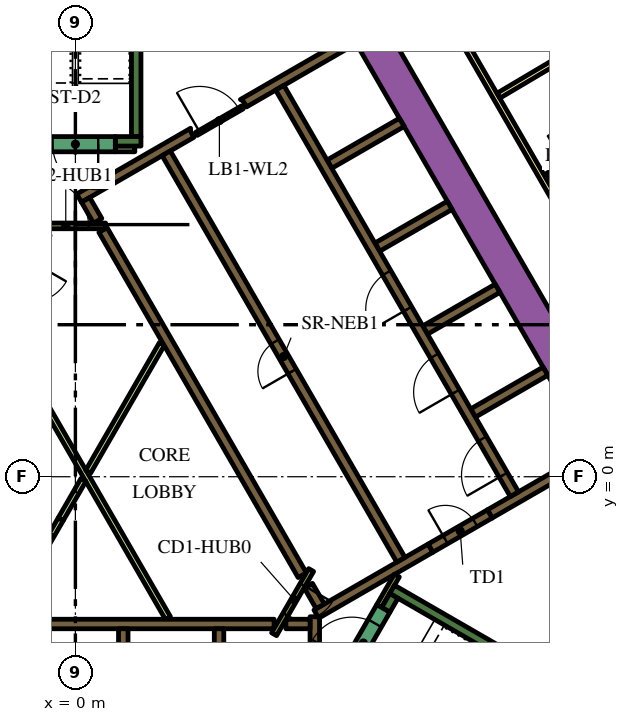
"""IFC4 building model, lengths in metres.
Left out: names, types, materials, properties, quantities, classifications, styles, units other than length and angle.
Written with IfcOpenShell. Run it as: python <this file> out.ifc"""

import sys

from ifc_helpers import new_model, si_unit, direction, frame, frame_2d, origin, place, context, subcontext, project, spatial, polyline, rectangle, outline, extrude, element, fill, save


model = new_model("IFC4")
c1 = context("Model", 3, precision=1e-05, world=origin(), true_north=direction((0.0, 1.0)))
c2 = subcontext(c1, "Body", "Model", "MODEL_VIEW")
j1 = project(units=[si_unit("LENGTHUNIT", "METRE"), si_unit("PLANEANGLEUNIT", "RADIAN")], contexts=[c1])
p1 = place(None, origin())
s1 = spatial("IfcSite", under=j1, at=p1, CompositionType="ELEMENT")
p2 = place(p1, origin())
s2 = spatial("IfcBuilding", under=s1, at=p2, CompositionType="ELEMENT")
p3 = place(p2, frame((0.0, 0.0, 122.7)))
s3 = spatial("IfcBuildingStorey", under=s2, at=p3, CompositionType="ELEMENT", Elevation=122.7)
p4 = place(p3, frame((6.776, 13.364, 0.0), z_axis=(0.0, 0.0, 1.0), x_axis=(0.500004177138, -0.8660229921, 0.0)))
e1 = element("IfcWall", 1, at=p4, inside=s3, PredefinedType="SOLIDWALL", context=c2, shape_type="SweptSolid", body=[
    extrude(rectangle(XDim=20.204, YDim=0.9, at=frame_2d((10.102, 0.0))), origin(), (0.0, 0.0, 1.0), 3.9),
])
p5 = place(p3, frame((11.943, -12.214, 0.0), z_axis=(0.0, 0.0, 1.0), x_axis=(0.49998092645, 0.866036415623, 0.0)))
e2 = element("IfcWall", 2, at=p5, inside=s3, PredefinedType="SOLIDWALL", context=c2, shape_type="SweptSolid", body=[
    extrude(rectangle(XDim=8.83, YDim=0.9, at=frame_2d((4.415, 0.0))), origin(), (0.0, 0.0, 1.0), 3.9),
])
p6 = place(p3, frame((8.334, -2.964, 0.0), z_axis=(0.0, 0.0, 1.0), x_axis=(0.866016039709, -0.500016218704, 0.0)))
e3 = element("IfcWall", 3, at=p6, inside=s3, PredefinedType="SOLIDWALL", context=c2, shape_type="SweptSolid", body=[
    extrude(rectangle(XDim=7.05, YDim=0.25, at=frame_2d((3.525, 0.0))), origin(), (0.0, 0.0, 1.0), 3.9),
])
p7 = place(p3, frame((8.168, -3.503, 0.0), z_axis=(0.0, 0.0, 1.0), x_axis=(0.49972245349, 0.866185586049, 0.0)))
e4 = element("IfcWall", 4, at=p7, inside=s3, PredefinedType="SOLIDWALL", context=c2, shape_type="SweptSolid", body=[
    extrude(rectangle(XDim=0.425, YDim=0.25, at=frame_2d((0.212, 0.0))), origin(), (0.0, 0.0, 1.0), 3.9),
])
p8 = place(p3, frame((1.6, 8.95, 0.0), z_axis=(0.0, 0.0, 1.0), x_axis=(0.0, 1.0, 0.0)))
e5 = element("IfcWall", 5, at=p8, inside=s3, PredefinedType="SOLIDWALL", context=c2, shape_type="SweptSolid", body=[
    extrude(rectangle(XDim=6.8, YDim=0.25, at=frame_2d((3.4, 0.0))), origin(), (0.0, 0.0, 1.0), 3.9),
])
p9 = place(p3, frame((1.05, 8.825, 0.0), z_axis=(0.0, 0.0, 1.0), x_axis=(1.0, 0.0, 0.0)))
e6 = element("IfcWall", 6, at=p9, inside=s3, PredefinedType="SOLIDWALL", context=c2, shape_type="SweptSolid", body=[
    extrude(rectangle(XDim=0.675, YDim=0.25, at=frame_2d((0.337, 0.0))), origin(), (0.0, 0.0, 1.0), 3.9),
])
p10 = place(p3, frame((-5.259, -3.875, 0.0), z_axis=(0.0, 0.0, 1.0), x_axis=(1.0, 0.0, 0.0)))
e7 = element("IfcWall", 7, at=p10, inside=s3, PredefinedType="SOLIDWALL", context=c2, shape_type="SweptSolid", body=[
    extrude(rectangle(XDim=10.489, YDim=0.25, at=frame_2d((5.244, 0.0))), origin(), (0.0, 0.0, 1.0), 3.9),
])
for number, where, z_axis, x_axis in (
    (8, (3.78, -4.0, 0.0), (0.0, 0.0, 1.0), (0.0, -1.0, 0.0)),
    (9, (1.26, -4.0, 0.0), (0.0, 0.0, 1.0), (0.0, -1.0, 0.0)),
):
    element("IfcWall", number, at=place(p3, frame(where, z_axis=z_axis, x_axis=x_axis)), inside=s3, PredefinedType="SOLIDWALL", context=c2, shape_type="SweptSolid", body=[
        extrude(rectangle(XDim=2.2, YDim=0.25, at=frame_2d((1.1, 0.0))), origin(), (0.0, 0.0, 1.0), 3.9),
    ])
p11 = place(p3, frame((6.3, -7.27, 0.0), z_axis=(0.0, 0.0, 1.0), x_axis=(0.0, 1.0, 0.0)))
e10 = element("IfcWall", 10, at=p11, inside=s3, PredefinedType="SOLIDWALL", context=c2, shape_type="SweptSolid", body=[
    extrude(rectangle(XDim=3.586, YDim=0.25, at=frame_2d((1.793, 0.0))), origin(), (0.0, 0.0, 1.0), 3.9),
])
p12 = place(p3, frame((5.538, -3.875, 0.0), z_axis=(0.0, 0.0, 1.0), x_axis=(1.0, 0.0, 0.0)))
e11 = element("IfcWall", 11, at=p12, inside=s3, PredefinedType="SOLIDWALL", context=c2, shape_type="SweptSolid", body=[
    extrude(rectangle(XDim=0.637, YDim=0.25, at=frame_2d((0.318, 0.0))), origin(), (0.0, 0.0, 1.0), 3.9),
])
p13 = place(p3, frame((10.464, 1.677, 0.0), z_axis=(0.0, 0.0, 1.0), x_axis=(0.86605622881, 0.499946605688, 0.0)))
e12 = element("IfcWall", 12, at=p13, inside=s3, PredefinedType="SOLIDWALL", context=c2, shape_type="SweptSolid", body=[
    extrude(rectangle(XDim=2.2, YDim=0.25, at=frame_2d((1.1, 0.0))), origin(), (0.0, 0.0, 1.0), 3.9),
])
p14 = place(p3, frame((13.629, 0.594, 0.0), z_axis=(0.0, 0.0, 1.0), x_axis=(-0.86602790099, -0.499995674689, 0.0)))
e13 = element("IfcWall", 13, at=p14, inside=s3, PredefinedType="SOLIDWALL", context=c2, shape_type="SweptSolid", body=[
    extrude(rectangle(XDim=3.146, YDim=0.25, at=frame_2d((1.573, 0.0))), origin(), (0.0, 0.0, 1.0), 3.9),
])
p15 = place(p3, frame((9.346, -1.879, 0.0), z_axis=(0.0, 0.0, 1.0), x_axis=(-0.866048528039, -0.499959945477, 0.0)))
e14 = element("IfcWall", 14, at=p15, inside=s3, PredefinedType="SOLIDWALL", context=c2, shape_type="SweptSolid", body=[
    extrude(rectangle(XDim=3.47, YDim=0.25, at=frame_2d((1.735, 0.0))), origin(), (0.0, 0.0, 1.0), 3.9),
])
p16 = place(p3, frame((6.13, -2.867, 0.0), z_axis=(0.0, 0.0, 1.0), x_axis=(0.500160776593, -0.865932559475, 0.0)))
e15 = element("IfcWall", 15, at=p16, inside=s3, PredefinedType="SOLIDWALL", context=c2, shape_type="SweptSolid", body=[
    extrude(rectangle(XDim=0.627, YDim=0.25, at=frame_2d((0.313, 0.0))), origin(), (0.0, 0.0, 1.0), 3.9),
])
for number, where, z_axis, x_axis in (
    (16, (9.204, 3.859, 0.0), (0.0, 0.0, 1.0), (0.866, 0.5, 0.0)),
    (17, (7.944, 6.041, 0.0), (0.0, 0.0, 1.0), (0.866, 0.5, 0.0)),
    (18, (6.684, 8.224, 0.0), (0.0, 0.0, 1.0), (0.866, 0.5, 0.0)),
):
    element("IfcWall", number, at=place(p3, frame(where, z_axis=z_axis, x_axis=x_axis)), inside=s3, PredefinedType="SOLIDWALL", context=c2, shape_type="SweptSolid", body=[
        extrude(rectangle(XDim=2.2, YDim=0.25, at=frame_2d((1.1, 0.0))), origin(), (0.0, 0.0, 1.0), 3.9),
    ])
p17 = place(p3, origin())
e19 = element("IfcWall", 19, at=p17, inside=s3, PredefinedType="SOLIDWALL", context=c2, shape_type="SweptSolid", body=[
    extrude(outline(polyline([(2.776, 8.733), (2.499, 8.573), (2.498, 8.573), (2.498, 8.573), (2.282, 8.448), (2.282, 8.448), (0.377, 7.348), (0.16, 7.223), (0.035, 7.439), (3.032, 9.169), (3.03, 9.152), (3.03, 9.133), (3.031, 9.113), (3.035, 9.094), (3.04, 9.075), (3.047, 9.057), (3.056, 9.039), (3.119, 8.931), (2.776, 8.733)])), origin(), (0.0, 0.0, 1.0), 3.9),
])
e20 = element("IfcWall", 20, at=p17, inside=s3, PredefinedType="SOLIDWALL", context=c2, shape_type="SweptSolid", body=[
    extrude(outline(polyline([(5.27, 10.173), (5.27, 10.173), (4.683, 9.834), (4.504, 9.731), (4.442, 9.839), (4.431, 9.856), (4.419, 9.871), (4.406, 9.885), (4.39, 9.898), (4.374, 9.909), (4.357, 9.918), (4.341, 9.925), (7.266, 11.614), (7.391, 11.398), (5.486, 10.298), (5.486, 10.298), (5.27, 10.173), (5.27, 10.173)])), origin(), (0.0, 0.0, 1.0), 3.9),
])
p18 = place(p3, frame((0.268, 7.285, 0.0), z_axis=(0.0, 0.0, 1.0), x_axis=(0.500098681536, -0.865968422476, 0.0)))
e21 = element("IfcWall", 21, at=p18, inside=s3, PredefinedType="SOLIDWALL", context=c2, shape_type="SweptSolid", body=[
    extrude(rectangle(XDim=0.636, YDim=0.25, at=frame_2d((0.318, 0.0))), origin(), (0.0, 0.0, 1.0), 3.9),
])
p19 = place(p3, frame((5.97, -2.591, 0.0), z_axis=(0.0, 0.0, 1.0), x_axis=(-0.499994469932, 0.866028596547, 0.0)))
e22 = element("IfcWall", 22, at=p19, inside=s3, PredefinedType="SOLIDWALL", context=c2, shape_type="SweptSolid", body=[
    extrude(rectangle(XDim=10.488, YDim=0.25, at=frame_2d((5.244, 0.0))), origin(), (0.0, 0.0, 1.0), 3.9),
])
p20 = place(p3, frame((8.459, -2.599, 0.0), z_axis=(0.0, 0.0, 1.0), x_axis=(-0.500041054325, -0.866001699761, 0.0)))
e23 = element("IfcWall", 23, at=p20, inside=s3, PredefinedType="PARTITIONING", context=c2, shape_type="SweptSolid", body=[
    extrude(rectangle(XDim=0.929, YDim=0.15, at=frame_2d((0.464, 0.0))), origin(), (0.0, 0.0, 1.0), 3.9),
])
p21 = place(p3, frame((2.435, -3.718, 0.0), z_axis=(0.0, 0.0, 1.0), x_axis=(-0.499985176046, 0.866033962229, 0.0)))
e24 = element("IfcWall", 24, at=p21, inside=s3, PredefinedType="PARTITIONING", context=c2, shape_type="SweptSolid", body=[
    extrude(rectangle(XDim=8.875, YDim=0.15, at=frame_2d((4.438, 0.0))), origin(), (0.0, 0.0, 1.0), 2.75),
])
p22 = place(p3, frame((0.336, 0.132, 0.0), z_axis=(0.0, 0.0, 1.0), x_axis=(0.500001957507, 0.866024273614, 0.0)))
e25 = element("IfcWall", 25, at=p22, inside=s3, PredefinedType="PARTITIONING", context=c2, shape_type="SweptSolid", body=[
    extrude(rectangle(XDim=3.881, YDim=0.15, at=frame_2d((1.941, 0.0))), origin(), (0.0, 0.0, 1.0), 2.75),
])
p23 = place(p3, frame((-0.387, -1.121, 0.0), z_axis=(0.0, 0.0, 1.0), x_axis=(0.500057179532, 0.865992388649, 0.0)))
e26 = element("IfcWall", 26, at=p23, inside=s3, PredefinedType="PARTITIONING", context=c2, shape_type="SweptSolid", body=[
    extrude(rectangle(XDim=1.199, YDim=0.15, at=frame_2d((0.6, 0.0))), origin(), (0.0, 0.0, 1.0), 2.75),
])
p24 = place(p3, frame((1.05, 8.625, 0.0), z_axis=(0.0, 0.0, 1.0), x_axis=(1.0, 0.0, 0.0)))
e27 = element("IfcWall", 27, at=p24, inside=s3, PredefinedType="PARTITIONING", context=c2, shape_type="SweptSolid", body=[
    extrude(rectangle(XDim=0.514, YDim=0.15, at=frame_2d((0.257, 0.0))), origin(), (0.0, 0.0, 1.0), 2.75),
])
p25 = place(p3, frame((11.553, -0.46, 0.0), z_axis=(0.0, 0.0, 1.0), x_axis=(-0.500006514828, 0.866021642414, 0.0)))
e28 = element("IfcWall", 28, at=p25, inside=s3, PredefinedType="SOLIDWALL", context=c2, shape_type="SweptSolid", body=[
    extrude(rectangle(XDim=12.35, YDim=0.25, at=frame_2d((6.175, 0.0))), origin(), (0.0, 0.0, 1.0), 3.9),
])
p26 = place(p25, frame((0.585, 0.0, 0.0)))
e29 = element("IfcOpeningElement", 29, at=p26, cuts=e28, PredefinedType="OPENING", context=c2, shape_type="SweptSolid", body=[
    extrude(rectangle(XDim=1.1, YDim=2.1, at=frame_2d((0.55, 1.05))), frame((0.0, 0.135, 0.0), z_axis=(0.0, -1.0, 0.0), x_axis=(1.0, 0.0, 0.0)), (0.0, 0.0, 1.0), 0.27),
])
p27 = place(p25, frame((3.105, 0.0, 0.0)))
e30 = element("IfcOpeningElement", 30, at=p27, cuts=e28, PredefinedType="OPENING", context=c2, shape_type="SweptSolid", body=[
    extrude(rectangle(XDim=1.1, YDim=2.1, at=frame_2d((0.55, 1.05))), frame((0.0, 0.135, 0.0), z_axis=(0.0, -1.0, 0.0), x_axis=(1.0, 0.0, 0.0)), (0.0, 0.0, 1.0), 0.27),
])
p28 = place(p25, frame((5.625, 0.0, 0.0)))
e31 = element("IfcOpeningElement", 31, at=p28, cuts=e28, PredefinedType="OPENING", context=c2, shape_type="SweptSolid", body=[
    extrude(rectangle(XDim=1.1, YDim=2.1, at=frame_2d((0.55, 1.05))), frame((0.0, 0.135, 0.0), z_axis=(0.0, -1.0, 0.0), x_axis=(1.0, 0.0, 0.0)), (0.0, 0.0, 1.0), 0.27),
])
p29 = place(p3, frame((8.565, -2.185, 0.0), z_axis=(0.0, 0.0, 1.0), x_axis=(-0.499997954832, 0.866026584559, 0.0)))
e32 = element("IfcWall", 32, at=p29, inside=s3, PredefinedType="SOLIDWALL", context=c2, shape_type="SweptSolid", body=[
    extrude(rectangle(XDim=12.35, YDim=0.25, at=frame_2d((6.175, 0.0))), origin(), (0.0, 0.0, 1.0), 3.9),
])
p30 = place(p29, frame((5.725, 0.0, 0.0)))
e33 = element("IfcOpeningElement", 33, at=p30, cuts=e32, PredefinedType="OPENING", context=c2, shape_type="SweptSolid", body=[
    extrude(rectangle(XDim=0.9, YDim=2.1, at=frame_2d((0.45, 1.05))), frame((0.0, 0.135, 0.0), z_axis=(0.0, -1.0, 0.0), x_axis=(1.0, 0.0, 0.0)), (0.0, 0.0, 1.0), 0.27),
])
p31 = place(p3, frame((7.053, -5.284, 0.0), z_axis=(0.0, 0.0, 1.0), x_axis=(0.500078061341, 0.865980330357, 0.0)))
e34 = element("IfcWall", 34, at=p31, inside=s3, PredefinedType="SOLIDWALL", context=c2, shape_type="SweptSolid", body=[
    extrude(rectangle(XDim=2.1, YDim=0.4, at=frame_2d((1.05, 0.0))), origin(), (0.0, 0.0, 1.0), 3.9),
])
p32 = place(p31, frame((0.45, 0.0, 0.0)))
e35 = element("IfcOpeningElement", 35, at=p32, cuts=e34, PredefinedType="OPENING", context=c2, shape_type="SweptSolid", body=[
    extrude(rectangle(XDim=1.2, YDim=2.1, at=frame_2d((0.6, 1.05))), frame((0.0, 0.21, 0.0), z_axis=(0.0, -1.0, 0.0), x_axis=(1.0, 0.0, 0.0)), (0.0, 0.0, 1.0), 0.42),
])
p33 = place(p3, frame((9.346, -1.879, 0.0), z_axis=(0.0, 0.0, 1.0), x_axis=(0.866047807691, 0.499961193289, 0.0)))
e36 = element("IfcWall", 36, at=p33, inside=s3, PredefinedType="SOLIDWALL", context=c2, shape_type="SweptSolid", body=[
    extrude(rectangle(XDim=1.8, YDim=0.25, at=frame_2d((0.9, 0.0))), origin(), (0.0, 0.0, 1.0), 3.9),
])
p34 = place(p33, frame((0.45, 0.0, 0.0)))
e37 = element("IfcOpeningElement", 37, at=p34, cuts=e36, PredefinedType="OPENING", context=c2, shape_type="SweptSolid", body=[
    extrude(rectangle(XDim=0.9, YDim=2.1, at=frame_2d((0.45, 1.05))), frame((0.0, 0.135, 0.0), z_axis=(0.0, -1.0, 0.0), x_axis=(1.0, 0.0, 0.0)), (0.0, 0.0, 1.0), 0.27),
])
p35 = place(p3, frame((1.05, 8.75, 0.0), z_axis=(0.0, 0.0, 1.0), x_axis=(-1.0, 0.0, 0.0)))
e38 = element("IfcWall", 38, at=p35, inside=s3, PredefinedType="SOLIDWALL", context=c2, shape_type="SweptSolid", body=[
    extrude(rectangle(XDim=2.1, YDim=0.4, at=frame_2d((1.05, 0.0))), origin(), (0.0, 0.0, 1.0), 3.9),
])
p36 = place(p35, frame((0.45, 0.0, 0.0)))
e39 = element("IfcOpeningElement", 39, at=p36, cuts=e38, PredefinedType="OPENING", context=c2, shape_type="SweptSolid", body=[
    extrude(rectangle(XDim=1.2, YDim=2.1, at=frame_2d((0.6, 1.05))), frame((0.0, 0.21, 0.0), z_axis=(0.0, -1.0, 0.0), x_axis=(1.0, 0.0, 0.0)), (0.0, 0.0, 1.0), 0.42),
])
p37 = place(p3, frame((6.203, -2.456, 0.0), z_axis=(0.0, 0.0, 1.0), x_axis=(-0.500043961785, -0.866000020948, 0.0)))
e40 = element("IfcWall", 40, at=p37, inside=s3, PredefinedType="PARTITIONING", context=c2, shape_type="SweptSolid", body=[
    extrude(rectangle(XDim=1.95, YDim=0.15, at=frame_2d((0.975, 0.0))), origin(), (0.0, 0.0, 1.0), 3.9),
])
p38 = place(p37, frame((0.45, 0.0, 0.0)))
e41 = element("IfcOpeningElement", 41, at=p38, cuts=e40, PredefinedType="OPENING", context=c2, shape_type="SweptSolid", body=[
    extrude(rectangle(XDim=0.9, YDim=2.1, at=frame_2d((0.45, 1.05))), frame((0.0, 0.085, 0.0), z_axis=(0.0, -1.0, 0.0), x_axis=(1.0, 0.0, 0.0)), (0.0, 0.0, 1.0), 0.17),
])
p39 = place(p3, frame((-1.303, 6.6, 0.0), z_axis=(0.0, 0.0, 1.0), x_axis=(1.0, 0.0, 0.0)))
e42 = element("IfcWall", 42, at=p39, inside=s3, PredefinedType="PARTITIONING", context=c2, shape_type="SweptSolid", body=[
    extrude(rectangle(XDim=2.1, YDim=0.15, at=frame_2d((1.05, 0.0))), origin(), (0.0, 0.0, 1.0), 3.9),
])
p40 = place(p39, frame((0.45, 0.0, 0.0)))
e43 = element("IfcOpeningElement", 43, at=p40, cuts=e42, PredefinedType="OPENING", context=c2, shape_type="SweptSolid", body=[
    extrude(rectangle(XDim=1.2, YDim=2.1, at=frame_2d((0.6, 1.05))), frame((0.0, 0.085, 0.0), z_axis=(0.0, -1.0, 0.0), x_axis=(1.0, 0.0, 0.0)), (0.0, 0.0, 1.0), 0.17),
])
p41 = place(p3, frame((3.183, 9.02, 0.0), z_axis=(0.0, 0.0, 1.0), x_axis=(0.866034573852, 0.49998411664, 0.0)))
e44 = element("IfcWall", 44, at=p41, inside=s3, PredefinedType="PARTITIONING", context=c2, shape_type="SweptSolid", body=[
    extrude(rectangle(XDim=1.4, YDim=0.09, at=frame_2d((0.7, 0.0))), origin(), (0.0, 0.0, 1.0), 2.75),
])
p42 = place(p41, frame((0.1, 0.0, 0.0)))
e45 = element("IfcOpeningElement", 45, at=p42, cuts=e44, PredefinedType="OPENING", context=c2, shape_type="SweptSolid", body=[
    extrude(rectangle(XDim=1.2, YDim=2.1, at=frame_2d((0.6, 1.05))), frame((0.0, 0.055, 0.0), z_axis=(0.0, -1.0, 0.0), x_axis=(1.0, 0.0, 0.0)), (0.0, 0.0, 1.0), 0.11),
])
p43 = place(p3, frame((-1.287, -2.679, 0.0), z_axis=(0.0, 0.0, 1.0), x_axis=(0.499961193289, 0.866047807691, 0.0)))
e46 = element("IfcWall", 46, at=p43, inside=s3, PredefinedType="PARTITIONING", context=c2, shape_type="SweptSolid", body=[
    extrude(rectangle(XDim=1.8, YDim=0.15, at=frame_2d((0.9, 0.0))), origin(), (0.0, 0.0, 1.0), 2.75),
])
p44 = place(p43, frame((0.45, 0.0, 0.0)))
e47 = element("IfcOpeningElement", 47, at=p44, cuts=e46, PredefinedType="OPENING", context=c2, shape_type="SweptSolid", body=[
    extrude(rectangle(XDim=0.9, YDim=2.1, at=frame_2d((0.45, 1.05))), frame((0.0, 0.085, 0.0), z_axis=(0.0, -1.0, 0.0), x_axis=(1.0, 0.0, 0.0)), (0.0, 0.0, 1.0), 0.17),
])
p45 = place(p3, frame((6.163, 18.475, 0.0), z_axis=(0.0, 0.0, 1.0), x_axis=(0.500001317485, -0.866024643133, 0.0)))
e48 = element("IfcWall", 48, at=p45, inside=s3, PredefinedType="PARTITIONING", context=c2, shape_type="SweptSolid", body=[
    extrude(rectangle(XDim=25.767, YDim=0.15, at=frame_2d((12.883, 0.0))), origin(), (0.0, 0.0, 1.0), 2.75),
])
p46 = place(p45, frame((19.306, 0.0, 0.0)))
e49 = element("IfcOpeningElement", 49, at=p46, cuts=e48, PredefinedType="OPENING", context=c2, shape_type="SweptSolid", body=[
    extrude(rectangle(XDim=1.0, YDim=2.1, at=frame_2d((0.5, 1.05))), frame((0.0, 0.085, 0.0), z_axis=(0.0, -1.0, 0.0), x_axis=(1.0, 0.0, 0.0)), (0.0, 0.0, 1.0), 0.17),
])
p47 = place(p45, frame((17.999, 0.0, 0.0)))
e50 = element("IfcOpeningElement", 50, at=p47, cuts=e48, PredefinedType="OPENING", context=c2, shape_type="SweptSolid", body=[
    extrude(rectangle(XDim=1.0, YDim=2.1, at=frame_2d((0.5, 1.05))), frame((0.0, 0.085, 0.0), z_axis=(0.0, -1.0, 0.0), x_axis=(1.0, 0.0, 0.0)), (0.0, 0.0, 1.0), 0.17),
])
p48 = place(p45, frame((0.596, 0.0, 0.0)))
e51 = element("IfcOpeningElement", 51, at=p48, cuts=e48, PredefinedType="OPENING", context=c2, shape_type="SweptSolid", body=[
    extrude(rectangle(XDim=1.0, YDim=2.1, at=frame_2d((0.5, 1.05))), frame((0.0, 0.085, 0.0), z_axis=(0.0, -1.0, 0.0), x_axis=(1.0, 0.0, 0.0)), (0.0, 0.0, 1.0), 0.17),
])
p49 = place(p3, frame((17.379, 13.731, 0.0), z_axis=(0.0, 0.0, 1.0), x_axis=(-0.860132461691, -0.510070728768, 0.0)))
e52 = element("IfcWall", 52, at=p49, inside=s3, PredefinedType="PARTITIONING", context=c2, shape_type="SweptSolid", body=[
    extrude(rectangle(XDim=7.257, YDim=0.15, at=frame_2d((3.628, 0.0))), origin(), (0.0, 0.0, 1.0), 2.75),
])
p50 = place(p3, frame((12.355, 7.9, 0.0), z_axis=(0.0, 0.0, 1.0), x_axis=(0.866034573852, 0.49998411664, 0.0)))
e53 = element("IfcWall", 53, at=p50, inside=s3, PredefinedType="PARTITIONING", context=c2, shape_type="SweptSolid", body=[
    extrude(rectangle(XDim=2.8, YDim=0.1, at=frame_2d((1.4, 0.0))), origin(), (0.0, 0.0, 1.0), 2.75),
])
p51 = place(p50, frame((0.6, 0.0, 0.0)))
e54 = element("IfcOpeningElement", 54, at=p51, cuts=e53, PredefinedType="OPENING", context=c2, shape_type="SweptSolid", body=[
    extrude(rectangle(XDim=0.9, YDim=2.1, at=frame_2d((0.45, 1.05))), frame((0.0, 0.06, 0.0), z_axis=(0.0, -1.0, 0.0), x_axis=(1.0, 0.0, 0.0)), (0.0, 0.0, 1.0), 0.12),
])
p52 = place(p26, origin())
e55 = element("IfcDoor", 55, at=p52, inside=s3, OperationType="DOUBLE_DOOR_SLIDING", PredefinedType="DOOR", context=c2, shape_type="SweptSolid", body=[
    extrude(rectangle(XDim=1.1, YDim=2.1, at=frame_2d((0.55, 1.05))), frame((0.0, 0.025, 0.0), z_axis=(0.0, -1.0, 0.0), x_axis=(1.0, 0.0, 0.0)), (0.0, 0.0, 1.0), 0.05),
])
fill(e29, e55)
p53 = place(p27, origin())
e56 = element("IfcDoor", 56, at=p53, inside=s3, OperationType="DOUBLE_DOOR_SLIDING", PredefinedType="DOOR", context=c2, shape_type="SweptSolid", body=[
    extrude(rectangle(XDim=1.1, YDim=2.1, at=frame_2d((0.55, 1.05))), frame((0.0, 0.025, 0.0), z_axis=(0.0, -1.0, 0.0), x_axis=(1.0, 0.0, 0.0)), (0.0, 0.0, 1.0), 0.05),
])
fill(e30, e56)
p54 = place(p28, origin())
e57 = element("IfcDoor", 57, at=p54, inside=s3, OperationType="DOUBLE_DOOR_SLIDING", PredefinedType="DOOR", context=c2, shape_type="SweptSolid", body=[
    extrude(rectangle(XDim=1.1, YDim=2.1, at=frame_2d((0.55, 1.05))), frame((0.0, 0.025, 0.0), z_axis=(0.0, -1.0, 0.0), x_axis=(1.0, 0.0, 0.0)), (0.0, 0.0, 1.0), 0.05),
])
fill(e31, e57)
p55 = place(p30, origin())
e58 = element("IfcDoor", 58, at=p55, inside=s3, OperationType="SINGLE_SWING_LEFT", PredefinedType="DOOR", context=c2, shape_type="SweptSolid", body=[
    extrude(rectangle(XDim=0.9, YDim=2.1, at=frame_2d((0.45, 1.05))), frame((0.0, 0.025, 0.0), z_axis=(0.0, -1.0, 0.0), x_axis=(1.0, 0.0, 0.0)), (0.0, 0.0, 1.0), 0.05),
])
fill(e33, e58)
p56 = place(p32, origin())
e59 = element("IfcDoor", 59, at=p56, inside=s3, OperationType="SINGLE_SWING_LEFT", PredefinedType="DOOR", context=c2, shape_type="SweptSolid", body=[
    extrude(rectangle(XDim=1.2, YDim=2.1, at=frame_2d((0.6, 1.05))), frame((0.0, 0.025, 0.0), z_axis=(0.0, -1.0, 0.0), x_axis=(1.0, 0.0, 0.0)), (0.0, 0.0, 1.0), 0.05),
])
fill(e35, e59)
p57 = place(p34, origin())
e60 = element("IfcDoor", 60, at=p57, inside=s3, OperationType="SINGLE_SWING_LEFT", PredefinedType="DOOR", context=c2, shape_type="SweptSolid", body=[
    extrude(rectangle(XDim=0.9, YDim=2.1, at=frame_2d((0.45, 1.05))), frame((0.0, 0.025, 0.0), z_axis=(0.0, -1.0, 0.0), x_axis=(1.0, 0.0, 0.0)), (0.0, 0.0, 1.0), 0.05),
])
fill(e37, e60)
p58 = place(p36, origin())
e61 = element("IfcDoor", 61, at=p58, inside=s3, OperationType="SINGLE_SWING_LEFT", PredefinedType="DOOR", context=c2, shape_type="SweptSolid", body=[
    extrude(rectangle(XDim=1.2, YDim=2.1, at=frame_2d((0.6, 1.05))), frame((0.0, 0.025, 0.0), z_axis=(0.0, -1.0, 0.0), x_axis=(1.0, 0.0, 0.0)), (0.0, 0.0, 1.0), 0.05),
])
fill(e39, e61)
p59 = place(p38, origin())
e62 = element("IfcDoor", 62, at=p59, inside=s3, OperationType="SINGLE_SWING_LEFT", PredefinedType="DOOR", context=c2, shape_type="SweptSolid", body=[
    extrude(rectangle(XDim=0.9, YDim=2.1, at=frame_2d((0.45, 1.05))), frame((0.0, 0.025, 0.0), z_axis=(0.0, -1.0, 0.0), x_axis=(1.0, 0.0, 0.0)), (0.0, 0.0, 1.0), 0.05),
])
fill(e41, e62)
p60 = place(p40, origin())
e63 = element("IfcDoor", 63, at=p60, inside=s3, OperationType="SINGLE_SWING_LEFT", PredefinedType="DOOR", context=c2, shape_type="SweptSolid", body=[
    extrude(rectangle(XDim=1.2, YDim=2.1, at=frame_2d((0.6, 1.05))), frame((0.0, 0.025, 0.0), z_axis=(0.0, -1.0, 0.0), x_axis=(1.0, 0.0, 0.0)), (0.0, 0.0, 1.0), 0.05),
])
fill(e43, e63)
p61 = place(p42, origin())
e64 = element("IfcDoor", 64, at=p61, inside=s3, OperationType="SINGLE_SWING_LEFT", PredefinedType="DOOR", context=c2, shape_type="SweptSolid", body=[
    extrude(rectangle(XDim=1.2, YDim=2.1, at=frame_2d((0.6, 1.05))), frame((0.0, 0.025, 0.0), z_axis=(0.0, -1.0, 0.0), x_axis=(1.0, 0.0, 0.0)), (0.0, 0.0, 1.0), 0.05),
])
fill(e45, e64)
p62 = place(p44, origin())
e65 = element("IfcDoor", 65, at=p62, inside=s3, OperationType="SINGLE_SWING_LEFT", PredefinedType="DOOR", context=c2, shape_type="SweptSolid", body=[
    extrude(rectangle(XDim=0.9, YDim=2.1, at=frame_2d((0.45, 1.05))), frame((0.0, 0.025, 0.0), z_axis=(0.0, -1.0, 0.0), x_axis=(1.0, 0.0, 0.0)), (0.0, 0.0, 1.0), 0.05),
])
fill(e47, e65)
save(model, sys.argv[1])
